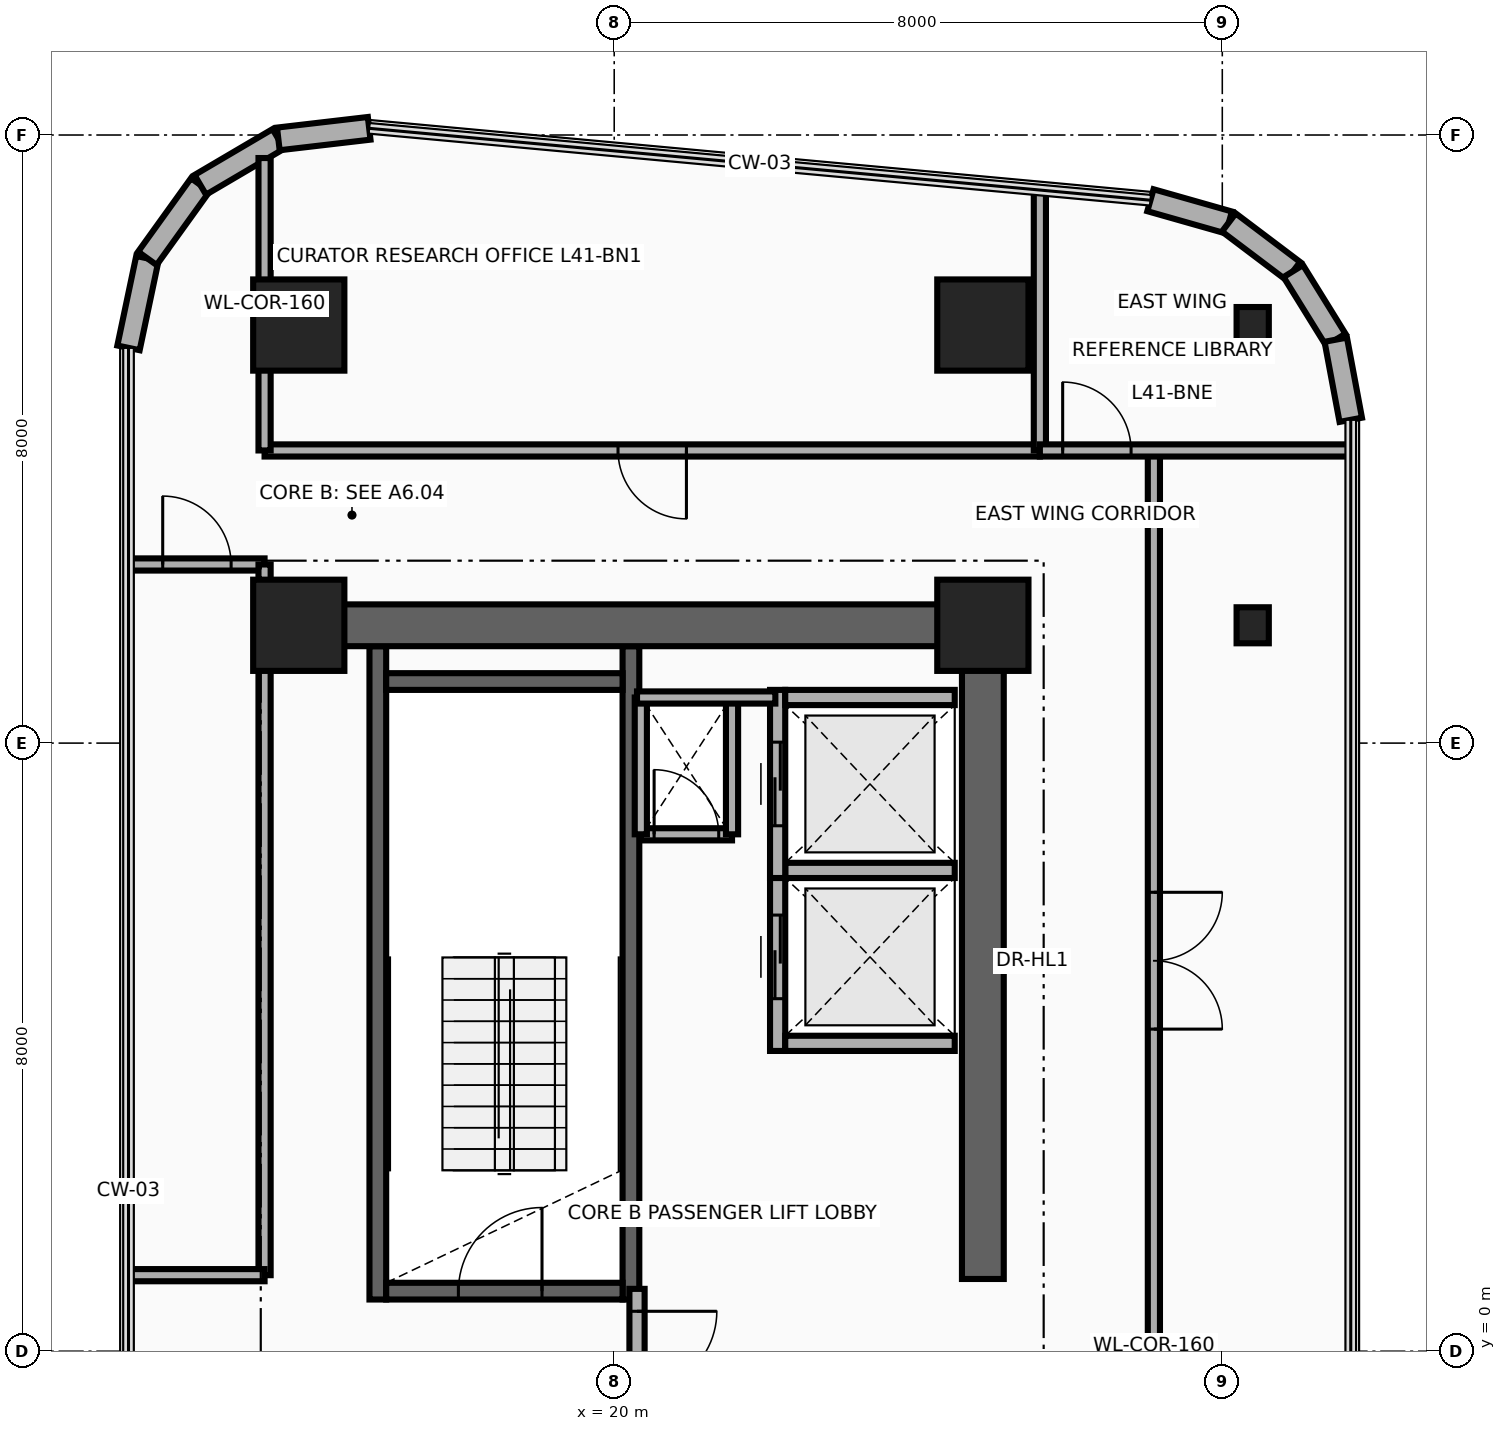
"""IFC4 building model, lengths in metres.
Left out: names, types, materials, properties, quantities, classifications, styles, units other than length and angle.
Written with IfcOpenShell. Run it as: python <this file> out.ifc"""

import sys

from ifc_helpers import new_model, si_unit, direction, frame, frame_2d, origin, origin_2d, place, context, subcontext, project, spatial, rectangle, i_section, extrude, source, transform, mapped, element, fill, save


model = new_model("IFC4")
c1 = context("Model", 3, precision=1e-05, world=origin(), true_north=direction((0.0, 1.0)))
c2 = subcontext(c1, "Body", "Model", "MODEL_VIEW")
j1 = project(units=[si_unit("LENGTHUNIT", "METRE"), si_unit("PLANEANGLEUNIT", "RADIAN")], contexts=[c1])
p1 = place(None, origin())
s1 = spatial("IfcSite", under=j1, at=p1, CompositionType="ELEMENT")
p2 = place(p1, origin())
s2 = spatial("IfcBuilding", under=s1, at=p2, CompositionType="ELEMENT")
p3 = place(p2, frame((0.0, 0.0, 161.2)))
s3 = spatial("IfcBuildingStorey", under=s2, at=p3, CompositionType="ELEMENT", Elevation=161.2)
for number, where, z_axis, x_axis in (
    (1, (16.89, 0.68, 0.0), (0.0, 0.0, 1.0), (0.0, 1.0, 0.0)),
    (2, (20.22, 0.68, 0.0), (0.0, 0.0, 1.0), (0.0, 1.0, 0.0)),
):
    element("IfcWall", number, at=place(p3, frame(where, z_axis=z_axis, x_axis=x_axis)), inside=s3, PredefinedType="SHEAR", context=c2, shape_type="SweptSolid", body=[
        extrude(rectangle(XDim=8.595, YDim=0.22, at=frame_2d((4.297, 0.0))), origin(), (0.0, 0.0, 1.0), 3.46),
    ])
p4 = place(p3, frame((17.0, 0.79, 0.0), z_axis=(0.0, 0.0, 1.0), x_axis=(1.0, 0.0, 0.0)))
e3 = element("IfcWall", 3, at=p4, inside=s3, PredefinedType="SHEAR", context=c2, shape_type="SweptSolid", body=[
    extrude(rectangle(XDim=3.11, YDim=0.22, at=frame_2d((1.555, 0.0))), origin(), (0.0, 0.0, 1.0), 3.46),
])
p5 = place(p4, frame((0.95, 0.0, 0.0)))
e4 = element("IfcOpeningElement", 4, at=p5, cuts=e3, PredefinedType="OPENING", context=c2, shape_type="SweptSolid", body=[
    extrude(rectangle(XDim=1.1, YDim=2.15, at=frame_2d((0.55, 1.075))), frame((0.0, 0.125, 0.0), z_axis=(0.0, -1.0, 0.0), x_axis=(1.0, 0.0, 0.0)), (0.0, 0.0, 1.0), 0.25),
])
p6 = place(p3, frame((17.0, 8.81, 0.0), z_axis=(0.0, 0.0, 1.0), x_axis=(1.0, 0.0, 0.0)))
e5 = element("IfcWall", 5, at=p6, inside=s3, PredefinedType="SHEAR", context=c2, shape_type="SweptSolid", body=[
    extrude(rectangle(XDim=3.11, YDim=0.22, at=frame_2d((1.555, 0.0))), origin(), (0.0, 0.0, 1.0), 3.46),
])
p7 = place(p3, frame((24.85, 0.95, 0.0), z_axis=(0.0, 0.0, 1.0), x_axis=(0.0, 1.0, 0.0)))
e6 = element("IfcWall", 6, at=p7, inside=s3, PredefinedType="SHEAR", context=c2, shape_type="SweptSolid", body=[
    extrude(rectangle(XDim=8.875, YDim=0.55, at=frame_2d((4.438, 0.0))), origin(), (0.0, 0.0, 1.0), 3.46),
])
p8 = place(p3, frame((15.85, 9.55, 0.0), z_axis=(0.0, 0.0, 1.0), x_axis=(1.0, 0.0, 0.0)))
e7 = element("IfcWall", 7, at=p8, inside=s3, PredefinedType="SHEAR", context=c2, shape_type="SweptSolid", body=[
    extrude(rectangle(XDim=9.0, YDim=0.55, at=frame_2d((4.5, 0.0))), origin(), (0.0, 0.0, 1.0), 3.46),
])
m1 = source(origin(), c2, "Body", "SweptSolid", [
    extrude(rectangle(XDim=1.2, YDim=1.2, at=origin_2d()), origin(), (0.0, 0.0, 1.0), 3.7),
])
for number, where, z_axis, x_axis in (
    (8, (15.85, 9.55, 0.0), (0.0, 0.0, 1.0), (1.0, 0.0, 0.0)),
    (9, (24.85, 9.55, 0.0), (0.0, 0.0, 1.0), (1.0, 0.0, 0.0)),
):
    element("IfcColumn", number, at=place(p3, frame(where, z_axis=z_axis, x_axis=x_axis)), inside=s3, PredefinedType="COLUMN", context=c2, shape_type="MappedRepresentation", body=[
        mapped(m1, transform((0.0, 0.0, 0.0), x_axis=(1.0, 0.0, 0.0), y_axis=(0.0, 1.0, 0.0), z_axis=(0.0, 0.0, 1.0), scale=1.0)),
    ])
m2 = source(origin(), c2, "Body", "SweptSolid", [
    extrude(i_section(OverallWidth=0.424, OverallDepth=0.474, WebThickness=0.048, FlangeThickness=0.077, at=origin_2d()), origin(), (0.0, 0.0, 1.0), 3.7),
])
p9 = place(p3, frame((28.4, 9.55, 0.0), z_axis=(0.0, 0.0, 1.0), x_axis=(1.0, 0.0, 0.0)))
e10 = element("IfcColumn", 10, at=p9, inside=s3, PredefinedType="COLUMN", context=c2, shape_type="MappedRepresentation", body=[
    mapped(m2, transform((0.0, 0.0, 0.0), x_axis=(1.0, 0.0, 0.0), y_axis=(0.0, 1.0, 0.0), z_axis=(0.0, 0.0, 1.0), scale=1.0)),
])
for number, where, z_axis, x_axis in (
    (11, (15.85, 13.5, 0.0), (0.0, 0.0, 1.0), (1.0, 0.0, 0.0)),
    (12, (24.85, 13.5, 0.0), (0.0, 0.0, 1.0), (1.0, 0.0, 0.0)),
):
    element("IfcColumn", number, at=place(p3, frame(where, z_axis=z_axis, x_axis=x_axis)), inside=s3, PredefinedType="COLUMN", context=c2, shape_type="MappedRepresentation", body=[
        mapped(m1, transform((0.0, 0.0, 0.0), x_axis=(1.0, 0.0, 0.0), y_axis=(0.0, 1.0, 0.0), z_axis=(0.0, 0.0, 1.0), scale=1.0)),
    ])
p10 = place(p3, frame((28.4, 13.5, 0.0), z_axis=(0.0, 0.0, 1.0), x_axis=(1.0, 0.0, 0.0)))
e13 = element("IfcColumn", 13, at=p10, inside=s3, PredefinedType="COLUMN", context=c2, shape_type="MappedRepresentation", body=[
    mapped(m2, transform((0.0, 0.0, 0.0), x_axis=(1.0, 0.0, 0.0), y_axis=(0.0, 1.0, 0.0), z_axis=(0.0, 0.0, 1.0), scale=1.0)),
])
p11 = place(p3, frame((13.61, 13.2, 0.0), z_axis=(0.0, 0.0, 1.0), x_axis=(0.206133180315, 0.978523945529, 0.0)))
e14 = element("IfcWall", 14, at=p11, inside=s3, PredefinedType="SOLIDWALL", context=c2, shape_type="SweptSolid", body=[
    extrude(rectangle(XDim=1.203, YDim=0.3, at=frame_2d((0.602, 0.0))), origin(), (0.0, 0.0, 1.0), 3.46),
])
for number, where, z_axis, x_axis in (
    (15, (13.858, 14.377, 0.0), (0.0, 0.0, 1.0), (0.584, 0.812, 0.0)),
    (16, (14.554, 15.344, 0.0), (0.0, 0.0, 1.0), (0.862, 0.507, 0.0)),
):
    element("IfcWall", number, at=place(p3, frame(where, z_axis=z_axis, x_axis=x_axis)), inside=s3, PredefinedType="SOLIDWALL", context=c2, shape_type="SweptSolid", body=[
        extrude(rectangle(XDim=1.192, YDim=0.3, at=frame_2d((0.596, 0.0))), origin(), (0.0, 0.0, 1.0), 3.46),
    ])
p12 = place(p3, frame((15.581, 15.949, 0.0), z_axis=(0.0, 0.0, 1.0), x_axis=(0.993288417722, 0.115663819837, 0.0)))
e17 = element("IfcWall", 17, at=p12, inside=s3, PredefinedType="SOLIDWALL", context=c2, shape_type="SweptSolid", body=[
    extrude(rectangle(XDim=1.203, YDim=0.3, at=frame_2d((0.602, 0.0))), origin(), (0.0, 0.0, 1.0), 3.46),
])
p13 = place(p3, frame((27.055, 15.142, 0.0), z_axis=(0.0, 0.0, 1.0), x_axis=(0.962012179147, -0.273006533206, 0.0)))
e18 = element("IfcWall", 18, at=p13, inside=s3, PredefinedType="SOLIDWALL", context=c2, shape_type="SweptSolid", body=[
    extrude(rectangle(XDim=1.072, YDim=0.3, at=frame_2d((0.536, 0.0))), origin(), (0.0, 0.0, 1.0), 3.46),
])
for number, where, z_axis, x_axis in (
    (19, (28.086, 14.849, 0.0), (0.0, 0.0, 1.0), (0.798, -0.602, 0.0)),
    (20, (28.934, 14.21, 0.0), (0.0, 0.0, 1.0), (0.527, -0.85, 0.0)),
):
    element("IfcWall", number, at=place(p3, frame(where, z_axis=z_axis, x_axis=x_axis)), inside=s3, PredefinedType="SOLIDWALL", context=c2, shape_type="SweptSolid", body=[
        extrude(rectangle(XDim=1.062, YDim=0.3, at=frame_2d((0.531, 0.0))), origin(), (0.0, 0.0, 1.0), 3.46),
    ])
p14 = place(p3, frame((29.493, 13.307, 0.0), z_axis=(0.0, 0.0, 1.0), x_axis=(0.183752343116, -0.98297257154, 0.0)))
e21 = element("IfcWall", 21, at=p14, inside=s3, PredefinedType="SOLIDWALL", context=c2, shape_type="SweptSolid", body=[
    extrude(rectangle(XDim=1.072, YDim=0.3, at=frame_2d((0.536, 0.0))), origin(), (0.0, 0.0, 1.0), 3.46),
])
p15 = place(p3, frame((22.15, 3.95, 0.0), z_axis=(0.0, 0.0, 1.0), x_axis=(0.0, 1.0, 0.0)))
e22 = element("IfcWall", 22, at=p15, inside=s3, PredefinedType="MOVABLE", context=c2, shape_type="SweptSolid", body=[
    extrude(rectangle(XDim=2.475, YDim=0.2, at=frame_2d((1.238, 0.0))), origin(), (0.0, 0.0, 1.0), 3.46),
])
p16 = place(p15, frame((0.688, 0.0, 0.0)))
e23 = element("IfcOpeningElement", 23, at=p16, cuts=e22, PredefinedType="OPENING", context=c2, shape_type="SweptSolid", body=[
    extrude(rectangle(XDim=1.1, YDim=2.1, at=frame_2d((0.55, 1.05))), frame((0.0, 0.115, 0.0), z_axis=(0.0, -1.0, 0.0), x_axis=(1.0, 0.0, 0.0)), (0.0, 0.0, 1.0), 0.23),
])
for number, where, z_axis, x_axis in (
    (24, (22.25, 4.05, 0.0), (0.0, 0.0, 1.0), (1.0, 0.0, 0.0)),
    (25, (22.25, 6.325, 0.0), (0.0, 0.0, 1.0), (1.0, 0.0, 0.0)),
):
    element("IfcWall", number, at=place(p3, frame(where, z_axis=z_axis, x_axis=x_axis)), inside=s3, PredefinedType="MOVABLE", context=c2, shape_type="SweptSolid", body=[
        extrude(rectangle(XDim=2.23, YDim=0.2, at=frame_2d((1.115, 0.0))), origin(), (0.0, 0.0, 1.0), 3.46),
    ])
p17 = place(p3, frame((22.15, 6.225, 0.0), z_axis=(0.0, 0.0, 1.0), x_axis=(0.0, 1.0, 0.0)))
e26 = element("IfcWall", 26, at=p17, inside=s3, PredefinedType="MOVABLE", context=c2, shape_type="SweptSolid", body=[
    extrude(rectangle(XDim=2.475, YDim=0.2, at=frame_2d((1.237, 0.0))), origin(), (0.0, 0.0, 1.0), 3.46),
])
p18 = place(p17, frame((0.688, 0.0, 0.0)))
e27 = element("IfcOpeningElement", 27, at=p18, cuts=e26, PredefinedType="OPENING", context=c2, shape_type="SweptSolid", body=[
    extrude(rectangle(XDim=1.1, YDim=2.1, at=frame_2d((0.55, 1.05))), frame((0.0, 0.115, 0.0), z_axis=(0.0, -1.0, 0.0), x_axis=(1.0, 0.0, 0.0)), (0.0, 0.0, 1.0), 0.23),
])
p19 = place(p3, frame((22.25, 8.6, 0.0), z_axis=(0.0, 0.0, 1.0), x_axis=(1.0, 0.0, 0.0)))
e28 = element("IfcWall", 28, at=p19, inside=s3, PredefinedType="MOVABLE", context=c2, shape_type="SweptSolid", body=[
    extrude(rectangle(XDim=2.23, YDim=0.2, at=frame_2d((1.115, 0.0))), origin(), (0.0, 0.0, 1.0), 3.46),
])
p20 = place(p3, frame((20.3, -0.82, 0.0), z_axis=(0.0, 0.0, 1.0), x_axis=(0.0, 1.0, 0.0)))
e29 = element("IfcWall", 29, at=p20, inside=s3, PredefinedType="PARTITIONING", context=c2, shape_type="SweptSolid", body=[
    extrude(rectangle(XDim=1.64, YDim=0.2, at=frame_2d((0.82, 0.0))), origin(), (0.0, 0.0, 1.0), 3.46),
])
p21 = place(p20, frame((0.295, 0.0, 0.0)))
e30 = element("IfcOpeningElement", 30, at=p21, cuts=e29, PredefinedType="OPENING", context=c2, shape_type="SweptSolid", body=[
    extrude(rectangle(XDim=1.05, YDim=2.15, at=frame_2d((0.525, 1.075))), frame((0.0, 0.115, 0.0), z_axis=(0.0, -1.0, 0.0), x_axis=(1.0, 0.0, 0.0)), (0.0, 0.0, 1.0), 0.23),
])
p22 = place(p3, frame((20.35, 6.8, 0.0), z_axis=(0.0, 0.0, 1.0), x_axis=(1.0, 0.0, 0.0)))
e31 = element("IfcWall", 31, at=p22, inside=s3, PredefinedType="PARTITIONING", context=c2, shape_type="SweptSolid", body=[
    extrude(rectangle(XDim=1.2, YDim=0.16, at=frame_2d((0.6, 0.0))), origin(), (0.0, 0.0, 1.0), 3.46),
])
p23 = place(p22, frame((0.175, 0.0, 0.0)))
e32 = element("IfcOpeningElement", 32, at=p23, cuts=e31, PredefinedType="OPENING", context=c2, shape_type="SweptSolid", body=[
    extrude(rectangle(XDim=0.85, YDim=2.05, at=frame_2d((0.425, 1.025))), frame((0.0, 0.095, 0.0), z_axis=(0.0, -1.0, 0.0), x_axis=(1.0, 0.0, 0.0)), (0.0, 0.0, 1.0), 0.19),
])
for number, where, z_axis, x_axis in (
    (33, (21.55, 6.8, 0.0), (0.0, 0.0, 1.0), (0.0, 1.0, 0.0)),
    (34, (20.35, 6.8, 0.0), (0.0, 0.0, 1.0), (0.0, 1.0, 0.0)),
):
    element("IfcWall", number, at=place(p3, frame(where, z_axis=z_axis, x_axis=x_axis)), inside=s3, PredefinedType="PARTITIONING", context=c2, shape_type="SweptSolid", body=[
        extrude(rectangle(XDim=1.8, YDim=0.16, at=frame_2d((0.9, 0.0))), origin(), (0.0, 0.0, 1.0), 3.46),
    ])
p24 = place(p3, frame((20.3, 8.6, 0.0), z_axis=(0.0, 0.0, 1.0), x_axis=(1.0, 0.0, 0.0)))
e35 = element("IfcWall", 35, at=p24, inside=s3, PredefinedType="PARTITIONING", context=c2, shape_type="SweptSolid", body=[
    extrude(rectangle(XDim=1.82, YDim=0.16, at=frame_2d((0.91, 0.0))), origin(), (0.0, 0.0, 1.0), 3.46),
])
p25 = place(p3, frame((15.4, 11.85, 0.0), z_axis=(0.0, 0.0, 1.0), x_axis=(1.0, 0.0, 0.0)))
e36 = element("IfcWall", 36, at=p25, inside=s3, PredefinedType="PARTITIONING", context=c2, shape_type="SweptSolid", body=[
    extrude(rectangle(XDim=10.2, YDim=0.16, at=frame_2d((5.1, 0.0))), origin(), (0.0, 0.0, 1.0), 2.834),
])
p26 = place(p25, frame((4.65, 0.0, 0.0)))
e37 = element("IfcOpeningElement", 37, at=p26, cuts=e36, PredefinedType="OPENING", context=c2, shape_type="SweptSolid", body=[
    extrude(rectangle(XDim=0.9, YDim=2.1, at=frame_2d((0.45, 1.05))), frame((0.0, 0.095, 0.0), z_axis=(0.0, -1.0, 0.0), x_axis=(1.0, 0.0, 0.0)), (0.0, 0.0, 1.0), 0.19),
])
p27 = place(p3, frame((15.4, 11.85, 0.0), z_axis=(0.0, 0.0, 1.0), x_axis=(0.0, 1.0, 0.0)))
e38 = element("IfcWall", 38, at=p27, inside=s3, PredefinedType="PARTITIONING", context=c2, shape_type="SweptSolid", body=[
    extrude(rectangle(XDim=3.847, YDim=0.16, at=frame_2d((1.923, 0.0))), origin(), (0.0, 0.0, 1.0), 3.46),
])
p28 = place(p3, frame((25.6, 11.85, 0.0), z_axis=(0.0, 0.0, 1.0), x_axis=(0.0, 1.0, 0.0)))
e39 = element("IfcWall", 39, at=p28, inside=s3, PredefinedType="PARTITIONING", context=c2, shape_type="SweptSolid", body=[
    extrude(rectangle(XDim=3.426, YDim=0.16, at=frame_2d((1.713, 0.0))), origin(), (0.0, 0.0, 1.0), 2.666),
])
p29 = place(p3, frame((27.1, -11.701, 0.0), z_axis=(0.0, 0.0, 1.0), x_axis=(0.0, 1.0, 0.0)))
e40 = element("IfcWall", 40, at=p29, inside=s3, PredefinedType="PARTITIONING", context=c2, shape_type="SweptSolid", body=[
    extrude(rectangle(XDim=23.551, YDim=0.16, at=frame_2d((11.775, 0.0))), origin(), (0.0, 0.0, 1.0), 2.666),
])
p30 = place(p29, frame((4.163, 0.0, 0.0)))
e41 = element("IfcOpeningElement", 41, at=p30, cuts=e40, PredefinedType="OPENING", context=c2, shape_type="SweptSolid", body=[
    extrude(rectangle(XDim=1.8, YDim=2.15, at=frame_2d((0.9, 1.075))), frame((0.0, 0.095, 0.0), z_axis=(0.0, -1.0, 0.0), x_axis=(1.0, 0.0, 0.0)), (0.0, 0.0, 1.0), 0.19),
])
p31 = place(p29, frame((15.938, 0.0, 0.0)))
e42 = element("IfcOpeningElement", 42, at=p31, cuts=e40, PredefinedType="OPENING", context=c2, shape_type="SweptSolid", body=[
    extrude(rectangle(XDim=1.8, YDim=2.15, at=frame_2d((0.9, 1.075))), frame((0.0, 0.095, 0.0), z_axis=(0.0, -1.0, 0.0), x_axis=(1.0, 0.0, 0.0)), (0.0, 0.0, 1.0), 0.19),
])
p32 = place(p3, frame((25.6, 11.85, 0.0), z_axis=(0.0, 0.0, 1.0), x_axis=(1.0, 0.0, 0.0)))
e43 = element("IfcWall", 43, at=p32, inside=s3, PredefinedType="PARTITIONING", context=c2, shape_type="SweptSolid", body=[
    extrude(rectangle(XDim=4.09, YDim=0.16, at=frame_2d((2.045, 0.0))), origin(), (0.0, 0.0, 1.0), 2.896),
])
p33 = place(p32, frame((0.3, 0.0, 0.0)))
e44 = element("IfcOpeningElement", 44, at=p33, cuts=e43, PredefinedType="OPENING", context=c2, shape_type="SweptSolid", body=[
    extrude(rectangle(XDim=0.9, YDim=2.1, at=frame_2d((0.45, 1.05))), frame((0.0, 0.095, 0.0), z_axis=(0.0, -1.0, 0.0), x_axis=(1.0, 0.0, 0.0)), (0.0, 0.0, 1.0), 0.19),
])
p34 = place(p3, frame((13.61, 10.35, 0.0), z_axis=(0.0, 0.0, 1.0), x_axis=(1.0, 0.0, 0.0)))
e45 = element("IfcWall", 45, at=p34, inside=s3, PredefinedType="PARTITIONING", context=c2, shape_type="SweptSolid", body=[
    extrude(rectangle(XDim=1.79, YDim=0.16, at=frame_2d((0.895, 0.0))), origin(), (0.0, 0.0, 1.0), 3.46),
])
p35 = place(p34, frame((0.45, 0.0, 0.0)))
e46 = element("IfcOpeningElement", 46, at=p35, cuts=e45, PredefinedType="OPENING", context=c2, shape_type="SweptSolid", body=[
    extrude(rectangle(XDim=0.9, YDim=2.1, at=frame_2d((0.45, 1.05))), frame((0.0, 0.095, 0.0), z_axis=(0.0, -1.0, 0.0), x_axis=(1.0, 0.0, 0.0)), (0.0, 0.0, 1.0), 0.19),
])
p36 = place(p3, frame((15.4, 1.0, 0.0), z_axis=(0.0, 0.0, 1.0), x_axis=(0.0, 1.0, 0.0)))
e47 = element("IfcWall", 47, at=p36, inside=s3, PredefinedType="PARTITIONING", context=c2, shape_type="SweptSolid", body=[
    extrude(rectangle(XDim=9.35, YDim=0.16, at=frame_2d((4.675, 0.0))), origin(), (0.0, 0.0, 1.0), 3.46),
])
p37 = place(p3, frame((13.61, 1.0, 0.0), z_axis=(0.0, 0.0, 1.0), x_axis=(1.0, 0.0, 0.0)))
e48 = element("IfcWall", 48, at=p37, inside=s3, PredefinedType="PARTITIONING", context=c2, shape_type="SweptSolid", body=[
    extrude(rectangle(XDim=1.79, YDim=0.16, at=frame_2d((0.895, 0.0))), origin(), (0.0, 0.0, 1.0), 3.46),
])
p38 = place(p16, origin())
e49 = element("IfcDoor", 49, at=p38, inside=s3, OperationType="DOUBLE_DOOR_SLIDING", PredefinedType="DOOR", context=c2, shape_type="SweptSolid", body=[
    extrude(rectangle(XDim=1.1, YDim=2.1, at=frame_2d((0.55, 1.05))), frame((0.0, 0.025, 0.0), z_axis=(0.0, -1.0, 0.0), x_axis=(1.0, 0.0, 0.0)), (0.0, 0.0, 1.0), 0.05),
])
fill(e23, e49)
p39 = place(p18, origin())
e50 = element("IfcDoor", 50, at=p39, inside=s3, OperationType="DOUBLE_DOOR_SLIDING", PredefinedType="DOOR", context=c2, shape_type="SweptSolid", body=[
    extrude(rectangle(XDim=1.1, YDim=2.1, at=frame_2d((0.55, 1.05))), frame((0.0, 0.025, 0.0), z_axis=(0.0, -1.0, 0.0), x_axis=(1.0, 0.0, 0.0)), (0.0, 0.0, 1.0), 0.05),
])
fill(e27, e50)
p40 = place(p21, frame((1.05, 0.0, 0.0), z_axis=(0.0, 0.0, 1.0), x_axis=(-1.0, 0.0, 0.0)))
e51 = element("IfcDoor", 51, at=p40, inside=s3, OperationType="SINGLE_SWING_LEFT", PredefinedType="DOOR", context=c2, shape_type="SweptSolid", body=[
    extrude(rectangle(XDim=1.05, YDim=2.15, at=frame_2d((0.525, 1.075))), frame((0.0, 0.025, 0.0), z_axis=(0.0, -1.0, 0.0), x_axis=(1.0, 0.0, 0.0)), (0.0, 0.0, 1.0), 0.05),
])
fill(e30, e51)
p41 = place(p5, origin())
e52 = element("IfcDoor", 52, at=p41, inside=s3, OperationType="SINGLE_SWING_RIGHT", PredefinedType="DOOR", context=c2, shape_type="SweptSolid", body=[
    extrude(rectangle(XDim=1.1, YDim=2.15, at=frame_2d((0.55, 1.075))), frame((0.0, 0.025, 0.0), z_axis=(0.0, -1.0, 0.0), x_axis=(1.0, 0.0, 0.0)), (0.0, 0.0, 1.0), 0.05),
])
fill(e4, e52)
p42 = place(p23, origin())
e53 = element("IfcDoor", 53, at=p42, inside=s3, OperationType="SINGLE_SWING_RIGHT", PredefinedType="DOOR", context=c2, shape_type="SweptSolid", body=[
    extrude(rectangle(XDim=0.85, YDim=2.05, at=frame_2d((0.425, 1.025))), frame((0.0, 0.025, 0.0), z_axis=(0.0, -1.0, 0.0), x_axis=(1.0, 0.0, 0.0)), (0.0, 0.0, 1.0), 0.05),
])
fill(e32, e53)
p43 = place(p26, frame((0.9, 0.0, 0.0), z_axis=(0.0, 0.0, 1.0), x_axis=(-1.0, 0.0, 0.0)))
e54 = element("IfcDoor", 54, at=p43, inside=s3, OperationType="SINGLE_SWING_LEFT", PredefinedType="DOOR", context=c2, shape_type="SweptSolid", body=[
    extrude(rectangle(XDim=0.9, YDim=2.1, at=frame_2d((0.45, 1.05))), frame((0.0, 0.025, 0.0), z_axis=(0.0, -1.0, 0.0), x_axis=(1.0, 0.0, 0.0)), (0.0, 0.0, 1.0), 0.05),
])
fill(e37, e54)
p44 = place(p33, origin())
e55 = element("IfcDoor", 55, at=p44, inside=s3, OperationType="SINGLE_SWING_LEFT", PredefinedType="DOOR", context=c2, shape_type="SweptSolid", body=[
    extrude(rectangle(XDim=0.9, YDim=2.1, at=frame_2d((0.45, 1.05))), frame((0.0, 0.025, 0.0), z_axis=(0.0, -1.0, 0.0), x_axis=(1.0, 0.0, 0.0)), (0.0, 0.0, 1.0), 0.05),
])
fill(e44, e55)
p45 = place(p31, frame((1.8, 0.0, 0.0), z_axis=(0.0, 0.0, 1.0), x_axis=(-1.0, 0.0, 0.0)))
e56 = element("IfcDoor", 56, at=p45, inside=s3, OperationType="DOUBLE_DOOR_SINGLE_SWING", PredefinedType="DOOR", context=c2, shape_type="SweptSolid", body=[
    extrude(rectangle(XDim=1.8, YDim=2.15, at=frame_2d((0.9, 1.075))), frame((0.0, 0.025, 0.0), z_axis=(0.0, -1.0, 0.0), x_axis=(1.0, 0.0, 0.0)), (0.0, 0.0, 1.0), 0.05),
])
fill(e42, e56)
p46 = place(p35, origin())
e57 = element("IfcDoor", 57, at=p46, inside=s3, OperationType="SINGLE_SWING_RIGHT", PredefinedType="DOOR", context=c2, shape_type="SweptSolid", body=[
    extrude(rectangle(XDim=0.9, YDim=2.1, at=frame_2d((0.45, 1.05))), frame((0.0, 0.025, 0.0), z_axis=(0.0, -1.0, 0.0), x_axis=(1.0, 0.0, 0.0)), (0.0, 0.0, 1.0), 0.05),
])
fill(e46, e57)
save(model, sys.argv[1])
